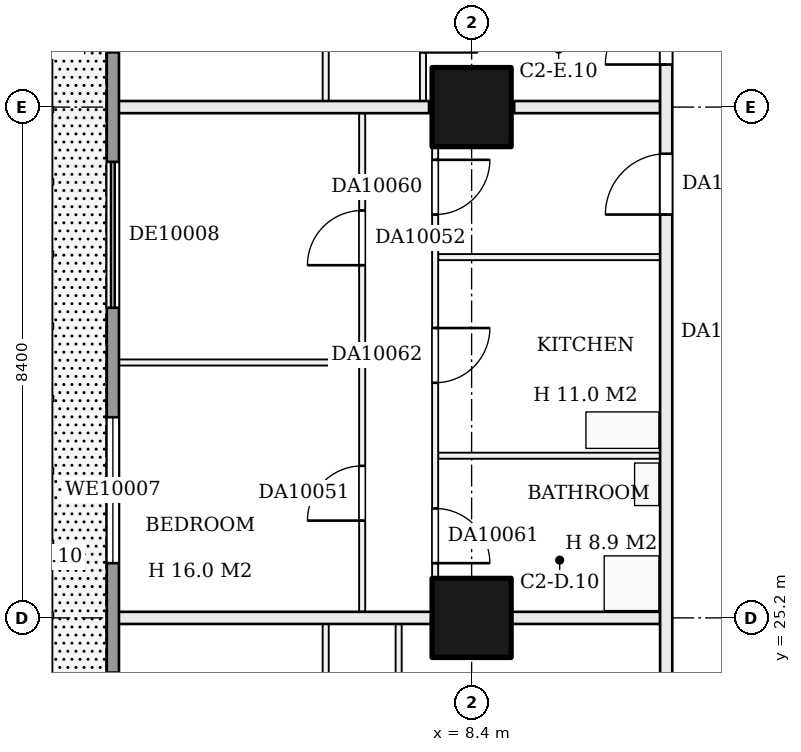
"""IFC4 building model, lengths in metres.
Left out: names, types, materials, properties, quantities, classifications, styles, units other than length and angle.
Written with IfcOpenShell. Run it as: python <this file> out.ifc"""

import sys

from ifc_helpers import new_model, si_unit, direction, frame, frame_2d, origin, origin_2d, place, context, subcontext, project, spatial, rectangle, extrude, element, fill, save


model = new_model("IFC4")
c1 = context("Model", 3, precision=1e-05, world=origin(), true_north=direction((0.0, 1.0)))
c2 = subcontext(c1, "Body", "Model", "MODEL_VIEW")
j1 = project(units=[si_unit("LENGTHUNIT", "METRE"), si_unit("PLANEANGLEUNIT", "RADIAN")], contexts=[c1])
p1 = place(None, origin())
s1 = spatial("IfcSite", under=j1, at=p1, CompositionType="ELEMENT")
p2 = place(p1, origin())
s2 = spatial("IfcBuilding", under=s1, at=p2, CompositionType="ELEMENT")
p3 = place(p2, frame((0.0, 0.0, 46.2)))
s3 = spatial("IfcBuildingStorey", under=s2, at=p3, CompositionType="ELEMENT", Elevation=46.2)
for number, where, z_axis, x_axis in (
    (1, (8.4, 25.2, 0.0), (0.0, 0.0, 1.0), (1.0, 0.0, 0.0)),
    (2, (8.4, 33.6, 0.0), (0.0, 0.0, 1.0), (1.0, 0.0, 0.0)),
):
    element("IfcColumn", number, at=place(p3, frame(where, z_axis=z_axis, x_axis=x_axis)), inside=s3, PredefinedType="COLUMN", context=c2, shape_type="SweptSolid", body=[
        extrude(rectangle(XDim=1.3, YDim=1.3, at=origin_2d()), origin(), (0.0, 0.0, 1.0), 3.22),
    ])
p4 = place(p3, frame((2.5, 25.2, 0.0), z_axis=(0.0, 0.0, 1.0), x_axis=(1.0, 0.0, 0.0)))
e3 = element("IfcWall", 3, at=p4, inside=s3, PredefinedType="PARTITIONING", context=c2, shape_type="SweptSolid", body=[
    extrude(rectangle(XDim=9.0, YDim=0.2, at=frame_2d((4.5, 0.0))), origin(), (0.0, 0.0, 1.0), 3.22),
])
p5 = place(p3, frame((7.85, 27.867, 0.0), z_axis=(0.0, 0.0, 1.0), x_axis=(1.0, 0.0, 0.0)))
e4 = element("IfcWall", 4, at=p5, inside=s3, PredefinedType="PARTITIONING", context=c2, shape_type="SweptSolid", body=[
    extrude(rectangle(XDim=3.65, YDim=0.1, at=frame_2d((1.825, 0.0))), origin(), (0.0, 0.0, 1.0), 3.22),
])
p6 = place(p3, frame((2.5, 29.4, 0.0), z_axis=(0.0, 0.0, 1.0), x_axis=(1.0, 0.0, 0.0)))
e5 = element("IfcWall", 5, at=p6, inside=s3, PredefinedType="PARTITIONING", context=c2, shape_type="SweptSolid", body=[
    extrude(rectangle(XDim=4.05, YDim=0.1, at=frame_2d((2.025, 0.0))), origin(), (0.0, 0.0, 1.0), 3.22),
])
p7 = place(p3, frame((7.85, 31.133, 0.0), z_axis=(0.0, 0.0, 1.0), x_axis=(1.0, 0.0, 0.0)))
e6 = element("IfcWall", 6, at=p7, inside=s3, PredefinedType="PARTITIONING", context=c2, shape_type="SweptSolid", body=[
    extrude(rectangle(XDim=3.65, YDim=0.1, at=frame_2d((1.825, 0.0))), origin(), (0.0, 0.0, 1.0), 3.22),
])
p8 = place(p3, frame((2.5, 33.6, 0.0), z_axis=(0.0, 0.0, 1.0), x_axis=(1.0, 0.0, 0.0)))
e7 = element("IfcWall", 7, at=p8, inside=s3, PredefinedType="PARTITIONING", context=c2, shape_type="SweptSolid", body=[
    extrude(rectangle(XDim=5.2, YDim=0.2, at=frame_2d((2.6, 0.0))), origin(), (0.0, 0.0, 1.0), 3.22),
])
p9 = place(p3, frame((9.1, 33.6, 0.0), z_axis=(0.0, 0.0, 1.0), x_axis=(1.0, 0.0, 0.0)))
e8 = element("IfcWall", 8, at=p9, inside=s3, PredefinedType="PARTITIONING", context=c2, shape_type="SweptSolid", body=[
    extrude(rectangle(XDim=2.4, YDim=0.2, at=frame_2d((1.2, 0.0))), origin(), (0.0, 0.0, 1.0), 3.22),
])
p10 = place(p3, frame((6.0, 12.7, 0.0), z_axis=(0.0, 0.0, 1.0), x_axis=(0.0, 1.0, 0.0)))
e9 = element("IfcWall", 9, at=p10, inside=s3, PredefinedType="PARTITIONING", context=c2, shape_type="SweptSolid", body=[
    extrude(rectangle(XDim=12.4, YDim=0.1, at=frame_2d((6.2, 0.0))), origin(), (0.0, 0.0, 1.0), 3.22),
])
p11 = place(p10, frame((3.7, 0.0, 0.0)))
e10 = element("IfcOpeningElement", 10, at=p11, cuts=e9, PredefinedType="OPENING", context=c2, shape_type="SweptSolid", body=[
    extrude(rectangle(XDim=0.9, YDim=2.1, at=frame_2d((0.45, 1.05))), frame((0.0, 0.06, 0.0), z_axis=(0.0, -1.0, 0.0), x_axis=(1.0, 0.0, 0.0)), (0.0, 0.0, 1.0), 0.12),
])
p12 = place(p10, frame((10.0, 0.0, 0.0)))
e11 = element("IfcOpeningElement", 11, at=p12, cuts=e9, PredefinedType="OPENING", context=c2, shape_type="SweptSolid", body=[
    extrude(rectangle(XDim=0.9, YDim=2.1, at=frame_2d((0.45, 1.05))), frame((0.0, 0.06, 0.0), z_axis=(0.0, -1.0, 0.0), x_axis=(1.0, 0.0, 0.0)), (0.0, 0.0, 1.0), 0.12),
])
p13 = place(p3, frame((6.0, 33.7, 0.0), z_axis=(0.0, 0.0, 1.0), x_axis=(0.0, 1.0, 0.0)))
e12 = element("IfcWall", 12, at=p13, inside=s3, PredefinedType="PARTITIONING", context=c2, shape_type="SweptSolid", body=[
    extrude(rectangle(XDim=8.2, YDim=0.1, at=frame_2d((4.1, 0.0))), origin(), (0.0, 0.0, 1.0), 3.22),
])
p14 = place(p13, frame((1.5, 0.0, 0.0)))
e13 = element("IfcOpeningElement", 13, at=p14, cuts=e12, PredefinedType="OPENING", context=c2, shape_type="SweptSolid", body=[
    extrude(rectangle(XDim=0.9, YDim=2.1, at=frame_2d((0.45, 1.05))), frame((0.0, 0.06, 0.0), z_axis=(0.0, -1.0, 0.0), x_axis=(1.0, 0.0, 0.0)), (0.0, 0.0, 1.0), 0.12),
])
p15 = place(p13, frame((5.7, 0.0, 0.0)))
e14 = element("IfcOpeningElement", 14, at=p15, cuts=e12, PredefinedType="OPENING", context=c2, shape_type="SweptSolid", body=[
    extrude(rectangle(XDim=0.9, YDim=2.1, at=frame_2d((0.45, 1.05))), frame((0.0, 0.06, 0.0), z_axis=(0.0, -1.0, 0.0), x_axis=(1.0, 0.0, 0.0)), (0.0, 0.0, 1.0), 0.12),
])
p16 = place(p3, frame((6.6, 25.3, 0.0), z_axis=(0.0, 0.0, 1.0), x_axis=(0.0, 1.0, 0.0)))
e15 = element("IfcWall", 15, at=p16, inside=s3, PredefinedType="PARTITIONING", context=c2, shape_type="SweptSolid", body=[
    extrude(rectangle(XDim=8.2, YDim=0.1, at=frame_2d((4.1, 0.0))), origin(), (0.0, 0.0, 1.0), 3.22),
])
p17 = place(p16, frame((1.5, 0.0, 0.0)))
e16 = element("IfcOpeningElement", 16, at=p17, cuts=e15, PredefinedType="OPENING", context=c2, shape_type="SweptSolid", body=[
    extrude(rectangle(XDim=0.9, YDim=2.1, at=frame_2d((0.45, 1.05))), frame((0.0, 0.06, 0.0), z_axis=(0.0, -1.0, 0.0), x_axis=(1.0, 0.0, 0.0)), (0.0, 0.0, 1.0), 0.12),
])
p18 = place(p16, frame((5.7, 0.0, 0.0)))
e17 = element("IfcOpeningElement", 17, at=p18, cuts=e15, PredefinedType="OPENING", context=c2, shape_type="SweptSolid", body=[
    extrude(rectangle(XDim=0.9, YDim=2.1, at=frame_2d((0.45, 1.05))), frame((0.0, 0.06, 0.0), z_axis=(0.0, -1.0, 0.0), x_axis=(1.0, 0.0, 0.0)), (0.0, 0.0, 1.0), 0.12),
])
p19 = place(p3, frame((7.2, 12.7, 0.0), z_axis=(0.0, 0.0, 1.0), x_axis=(0.0, 1.0, 0.0)))
e18 = element("IfcWall", 18, at=p19, inside=s3, PredefinedType="PARTITIONING", context=c2, shape_type="SweptSolid", body=[
    extrude(rectangle(XDim=12.4, YDim=0.1, at=frame_2d((6.2, 0.0))), origin(), (0.0, 0.0, 1.0), 3.22),
])
p20 = place(p19, frame((6.4, 0.0, 0.0)))
e19 = element("IfcOpeningElement", 19, at=p20, cuts=e18, PredefinedType="OPENING", context=c2, shape_type="SweptSolid", body=[
    extrude(rectangle(XDim=0.9, YDim=2.1, at=frame_2d((0.45, 1.05))), frame((0.0, 0.06, 0.0), z_axis=(0.0, -1.0, 0.0), x_axis=(1.0, 0.0, 0.0)), (0.0, 0.0, 1.0), 0.12),
])
p21 = place(p19, frame((0.4, 0.0, 0.0)))
e20 = element("IfcOpeningElement", 20, at=p21, cuts=e18, PredefinedType="OPENING", context=c2, shape_type="SweptSolid", body=[
    extrude(rectangle(XDim=0.9, YDim=2.1, at=frame_2d((0.45, 1.05))), frame((0.0, 0.06, 0.0), z_axis=(0.0, -1.0, 0.0), x_axis=(1.0, 0.0, 0.0)), (0.0, 0.0, 1.0), 0.12),
])
p22 = place(p19, frame((2.65, 0.0, 0.0)))
e21 = element("IfcOpeningElement", 21, at=p22, cuts=e18, PredefinedType="OPENING", context=c2, shape_type="SweptSolid", body=[
    extrude(rectangle(XDim=0.9, YDim=2.1, at=frame_2d((0.45, 1.05))), frame((0.0, 0.06, 0.0), z_axis=(0.0, -1.0, 0.0), x_axis=(1.0, 0.0, 0.0)), (0.0, 0.0, 1.0), 0.12),
])
p23 = place(p19, frame((10.05, 0.0, 0.0)))
e22 = element("IfcOpeningElement", 22, at=p23, cuts=e18, PredefinedType="OPENING", context=c2, shape_type="SweptSolid", body=[
    extrude(rectangle(XDim=0.9, YDim=2.1, at=frame_2d((0.45, 1.05))), frame((0.0, 0.06, 0.0), z_axis=(0.0, -1.0, 0.0), x_axis=(1.0, 0.0, 0.0)), (0.0, 0.0, 1.0), 0.12),
])
p24 = place(p3, frame((7.6, 33.7, 0.0), z_axis=(0.0, 0.0, 1.0), x_axis=(0.0, 1.0, 0.0)))
e23 = element("IfcWall", 23, at=p24, inside=s3, PredefinedType="PARTITIONING", context=c2, shape_type="SweptSolid", body=[
    extrude(rectangle(XDim=8.2, YDim=0.1, at=frame_2d((4.1, 0.0))), origin(), (0.0, 0.0, 1.0), 3.22),
])
p25 = place(p24, frame((0.8, 0.0, 0.0)))
e24 = element("IfcOpeningElement", 24, at=p25, cuts=e23, PredefinedType="OPENING", context=c2, shape_type="SweptSolid", body=[
    extrude(rectangle(XDim=0.9, YDim=2.1, at=frame_2d((0.45, 1.05))), frame((0.0, 0.06, 0.0), z_axis=(0.0, -1.0, 0.0), x_axis=(1.0, 0.0, 0.0)), (0.0, 0.0, 1.0), 0.12),
])
p26 = place(p24, frame((3.567, 0.0, 0.0)))
e25 = element("IfcOpeningElement", 25, at=p26, cuts=e23, PredefinedType="OPENING", context=c2, shape_type="SweptSolid", body=[
    extrude(rectangle(XDim=0.9, YDim=2.1, at=frame_2d((0.45, 1.05))), frame((0.0, 0.06, 0.0), z_axis=(0.0, -1.0, 0.0), x_axis=(1.0, 0.0, 0.0)), (0.0, 0.0, 1.0), 0.12),
])
p27 = place(p24, frame((6.533, 0.0, 0.0)))
e26 = element("IfcOpeningElement", 26, at=p27, cuts=e23, PredefinedType="OPENING", context=c2, shape_type="SweptSolid", body=[
    extrude(rectangle(XDim=0.9, YDim=2.1, at=frame_2d((0.45, 1.05))), frame((0.0, 0.06, 0.0), z_axis=(0.0, -1.0, 0.0), x_axis=(1.0, 0.0, 0.0)), (0.0, 0.0, 1.0), 0.12),
])
p28 = place(p3, frame((7.8, 25.3, 0.0), z_axis=(0.0, 0.0, 1.0), x_axis=(0.0, 1.0, 0.0)))
e27 = element("IfcWall", 27, at=p28, inside=s3, PredefinedType="PARTITIONING", context=c2, shape_type="SweptSolid", body=[
    extrude(rectangle(XDim=8.2, YDim=0.1, at=frame_2d((4.1, 0.0))), origin(), (0.0, 0.0, 1.0), 3.22),
])
p29 = place(p28, frame((6.533, 0.0, 0.0)))
e28 = element("IfcOpeningElement", 28, at=p29, cuts=e27, PredefinedType="OPENING", context=c2, shape_type="SweptSolid", body=[
    extrude(rectangle(XDim=0.9, YDim=2.1, at=frame_2d((0.45, 1.05))), frame((0.0, 0.06, 0.0), z_axis=(0.0, -1.0, 0.0), x_axis=(1.0, 0.0, 0.0)), (0.0, 0.0, 1.0), 0.12),
])
p30 = place(p28, frame((0.8, 0.0, 0.0)))
e29 = element("IfcOpeningElement", 29, at=p30, cuts=e27, PredefinedType="OPENING", context=c2, shape_type="SweptSolid", body=[
    extrude(rectangle(XDim=0.9, YDim=2.1, at=frame_2d((0.45, 1.05))), frame((0.0, 0.06, 0.0), z_axis=(0.0, -1.0, 0.0), x_axis=(1.0, 0.0, 0.0)), (0.0, 0.0, 1.0), 0.12),
])
p31 = place(p28, frame((3.767, 0.0, 0.0)))
e30 = element("IfcOpeningElement", 30, at=p31, cuts=e27, PredefinedType="OPENING", context=c2, shape_type="SweptSolid", body=[
    extrude(rectangle(XDim=0.9, YDim=2.1, at=frame_2d((0.45, 1.05))), frame((0.0, 0.06, 0.0), z_axis=(0.0, -1.0, 0.0), x_axis=(1.0, 0.0, 0.0)), (0.0, 0.0, 1.0), 0.12),
])
p32 = place(p3, frame((11.6, 11.7, 0.0), z_axis=(0.0, 0.0, 1.0), x_axis=(0.0, 1.0, 0.0)))
e31 = element("IfcWall", 31, at=p32, inside=s3, PredefinedType="PARTITIONING", context=c2, shape_type="SweptSolid", body=[
    extrude(rectangle(XDim=30.3, YDim=0.2, at=frame_2d((15.15, 0.0))), origin(), (0.0, 0.0, 1.0), 3.22),
])
p33 = place(p32, frame((7.3, 0.0, 0.0)))
e32 = element("IfcOpeningElement", 32, at=p33, cuts=e31, PredefinedType="OPENING", context=c2, shape_type="SweptSolid", body=[
    extrude(rectangle(XDim=1.0, YDim=2.1, at=frame_2d((0.5, 1.05))), frame((0.0, 0.11, 0.0), z_axis=(0.0, -1.0, 0.0), x_axis=(1.0, 0.0, 0.0)), (0.0, 0.0, 1.0), 0.22),
])
p34 = place(p32, frame((20.133, 0.0, 0.0)))
e33 = element("IfcOpeningElement", 33, at=p34, cuts=e31, PredefinedType="OPENING", context=c2, shape_type="SweptSolid", body=[
    extrude(rectangle(XDim=1.0, YDim=2.1, at=frame_2d((0.5, 1.05))), frame((0.0, 0.11, 0.0), z_axis=(0.0, -1.0, 0.0), x_axis=(1.0, 0.0, 0.0)), (0.0, 0.0, 1.0), 0.22),
])
p35 = place(p32, frame((22.6, 0.0, 0.0)))
e34 = element("IfcOpeningElement", 34, at=p35, cuts=e31, PredefinedType="OPENING", context=c2, shape_type="SweptSolid", body=[
    extrude(rectangle(XDim=1.0, YDim=2.1, at=frame_2d((0.5, 1.05))), frame((0.0, 0.11, 0.0), z_axis=(0.0, -1.0, 0.0), x_axis=(1.0, 0.0, 0.0)), (0.0, 0.0, 1.0), 0.22),
])
p36 = place(p3, frame((2.5, 53.8, 0.0), z_axis=(0.0, 0.0, 1.0), x_axis=(0.0, -1.0, 0.0)))
e35 = element("IfcWall", 35, at=p36, inside=s3, PredefinedType="SOLIDWALL", context=c2, shape_type="SweptSolid", body=[
    extrude(rectangle(XDim=48.8, YDim=0.2, at=frame_2d((24.4, 0.0))), origin(), (0.0, 0.0, 1.0), 3.22),
])
p37 = place(p36, frame((46.1, 0.0, 0.0)))
e36 = element("IfcOpeningElement", 36, at=p37, cuts=e35, PredefinedType="OPENING", context=c2, shape_type="SweptSolid", body=[
    extrude(rectangle(XDim=2.4, YDim=2.2, at=frame_2d((1.2, 1.1))), frame((0.0, 0.11, 0.0), z_axis=(0.0, -1.0, 0.0), x_axis=(1.0, 0.0, 0.0)), (0.0, 0.0, 1.0), 0.22),
])
p38 = place(p36, frame((42.1, 0.0, 0.0)))
e37 = element("IfcOpeningElement", 37, at=p38, cuts=e35, PredefinedType="OPENING", context=c2, shape_type="SweptSolid", body=[
    extrude(rectangle(XDim=2.4, YDim=2.2, at=frame_2d((1.2, 1.1))), frame((0.0, 0.11, 0.0), z_axis=(0.0, -1.0, 0.0), x_axis=(1.0, 0.0, 0.0)), (0.0, 0.0, 1.0), 0.22),
])
p39 = place(p36, frame((37.9, 0.0, 0.0)))
e38 = element("IfcOpeningElement", 38, at=p39, cuts=e35, PredefinedType="OPENING", context=c2, shape_type="SweptSolid", body=[
    extrude(rectangle(XDim=2.4, YDim=2.2, at=frame_2d((1.2, 1.1))), frame((0.0, 0.11, 0.0), z_axis=(0.0, -1.0, 0.0), x_axis=(1.0, 0.0, 0.0)), (0.0, 0.0, 1.0), 0.22),
])
p40 = place(p36, frame((33.7, 0.0, 0.0)))
e39 = element("IfcOpeningElement", 39, at=p40, cuts=e35, PredefinedType="OPENING", context=c2, shape_type="SweptSolid", body=[
    extrude(rectangle(XDim=2.4, YDim=2.2, at=frame_2d((1.2, 1.1))), frame((0.0, 0.11, 0.0), z_axis=(0.0, -1.0, 0.0), x_axis=(1.0, 0.0, 0.0)), (0.0, 0.0, 1.0), 0.22),
])
p41 = place(p36, frame((29.5, 0.0, 0.9)))
e40 = element("IfcOpeningElement", 40, at=p41, cuts=e35, PredefinedType="OPENING", context=c2, shape_type="SweptSolid", body=[
    extrude(rectangle(XDim=2.4, YDim=1.5, at=frame_2d((1.2, 0.75))), frame((0.0, 0.11, 0.0), z_axis=(0.0, -1.0, 0.0), x_axis=(1.0, 0.0, 0.0)), (0.0, 0.0, 1.0), 0.22),
])
p42 = place(p36, frame((25.3, 0.0, 0.9)))
e41 = element("IfcOpeningElement", 41, at=p42, cuts=e35, PredefinedType="OPENING", context=c2, shape_type="SweptSolid", body=[
    extrude(rectangle(XDim=2.4, YDim=1.5, at=frame_2d((1.2, 0.75))), frame((0.0, 0.11, 0.0), z_axis=(0.0, -1.0, 0.0), x_axis=(1.0, 0.0, 0.0)), (0.0, 0.0, 1.0), 0.22),
])
p43 = place(p36, frame((21.1, 0.0, 0.0)))
e42 = element("IfcOpeningElement", 42, at=p43, cuts=e35, PredefinedType="OPENING", context=c2, shape_type="SweptSolid", body=[
    extrude(rectangle(XDim=2.4, YDim=2.2, at=frame_2d((1.2, 1.1))), frame((0.0, 0.11, 0.0), z_axis=(0.0, -1.0, 0.0), x_axis=(1.0, 0.0, 0.0)), (0.0, 0.0, 1.0), 0.22),
])
p44 = place(p36, frame((16.9, 0.0, 0.0)))
e43 = element("IfcOpeningElement", 43, at=p44, cuts=e35, PredefinedType="OPENING", context=c2, shape_type="SweptSolid", body=[
    extrude(rectangle(XDim=2.4, YDim=2.2, at=frame_2d((1.2, 1.1))), frame((0.0, 0.11, 0.0), z_axis=(0.0, -1.0, 0.0), x_axis=(1.0, 0.0, 0.0)), (0.0, 0.0, 1.0), 0.22),
])
p45 = place(p36, frame((12.7, 0.0, 0.9)))
e44 = element("IfcOpeningElement", 44, at=p45, cuts=e35, PredefinedType="OPENING", context=c2, shape_type="SweptSolid", body=[
    extrude(rectangle(XDim=2.4, YDim=1.5, at=frame_2d((1.2, 0.75))), frame((0.0, 0.11, 0.0), z_axis=(0.0, -1.0, 0.0), x_axis=(1.0, 0.0, 0.0)), (0.0, 0.0, 1.0), 0.22),
])
p46 = place(p36, frame((8.5, 0.0, 0.9)))
e45 = element("IfcOpeningElement", 45, at=p46, cuts=e35, PredefinedType="OPENING", context=c2, shape_type="SweptSolid", body=[
    extrude(rectangle(XDim=2.4, YDim=1.5, at=frame_2d((1.2, 0.75))), frame((0.0, 0.11, 0.0), z_axis=(0.0, -1.0, 0.0), x_axis=(1.0, 0.0, 0.0)), (0.0, 0.0, 1.0), 0.22),
])
p47 = place(p36, frame((4.3, 0.0, 0.9)))
e46 = element("IfcOpeningElement", 46, at=p47, cuts=e35, PredefinedType="OPENING", context=c2, shape_type="SweptSolid", body=[
    extrude(rectangle(XDim=2.4, YDim=1.5, at=frame_2d((1.2, 0.75))), frame((0.0, 0.11, 0.0), z_axis=(0.0, -1.0, 0.0), x_axis=(1.0, 0.0, 0.0)), (0.0, 0.0, 1.0), 0.22),
])
p48 = place(p36, frame((0.3, 0.0, 0.0)))
e47 = element("IfcOpeningElement", 47, at=p48, cuts=e35, PredefinedType="OPENING", context=c2, shape_type="SweptSolid", body=[
    extrude(rectangle(XDim=2.4, YDim=2.2, at=frame_2d((1.2, 1.1))), frame((0.0, 0.11, 0.0), z_axis=(0.0, -1.0, 0.0), x_axis=(1.0, 0.0, 0.0)), (0.0, 0.0, 1.0), 0.22),
])
p49 = place(p17, origin())
e48 = element("IfcDoor", 48, at=p49, inside=s3, OperationType="SINGLE_SWING_LEFT", PredefinedType="DOOR", context=c2, shape_type="SweptSolid", body=[
    extrude(rectangle(XDim=0.9, YDim=2.1, at=frame_2d((0.45, 1.05))), frame((0.0, 0.025, 0.0), z_axis=(0.0, -1.0, 0.0), x_axis=(1.0, 0.0, 0.0)), (0.0, 0.0, 1.0), 0.05),
])
fill(e16, e48)
p50 = place(p18, origin())
e49 = element("IfcDoor", 49, at=p50, inside=s3, OperationType="SINGLE_SWING_LEFT", PredefinedType="DOOR", context=c2, shape_type="SweptSolid", body=[
    extrude(rectangle(XDim=0.9, YDim=2.1, at=frame_2d((0.45, 1.05))), frame((0.0, 0.025, 0.0), z_axis=(0.0, -1.0, 0.0), x_axis=(1.0, 0.0, 0.0)), (0.0, 0.0, 1.0), 0.05),
])
fill(e17, e49)
p51 = place(p29, frame((0.9, 0.0, 0.0), z_axis=(0.0, 0.0, 1.0), x_axis=(-1.0, 0.0, 0.0)))
e50 = element("IfcDoor", 50, at=p51, inside=s3, OperationType="SINGLE_SWING_LEFT", PredefinedType="DOOR", context=c2, shape_type="SweptSolid", body=[
    extrude(rectangle(XDim=0.9, YDim=2.1, at=frame_2d((0.45, 1.05))), frame((0.0, 0.025, 0.0), z_axis=(0.0, -1.0, 0.0), x_axis=(1.0, 0.0, 0.0)), (0.0, 0.0, 1.0), 0.05),
])
fill(e28, e50)
p52 = place(p30, frame((0.9, 0.0, 0.0), z_axis=(0.0, 0.0, 1.0), x_axis=(-1.0, 0.0, 0.0)))
e51 = element("IfcDoor", 51, at=p52, inside=s3, OperationType="SINGLE_SWING_RIGHT", PredefinedType="DOOR", context=c2, shape_type="SweptSolid", body=[
    extrude(rectangle(XDim=0.9, YDim=2.1, at=frame_2d((0.45, 1.05))), frame((0.0, 0.025, 0.0), z_axis=(0.0, -1.0, 0.0), x_axis=(1.0, 0.0, 0.0)), (0.0, 0.0, 1.0), 0.05),
])
fill(e29, e51)
p53 = place(p31, frame((0.9, 0.0, 0.0), z_axis=(0.0, 0.0, 1.0), x_axis=(-1.0, 0.0, 0.0)))
e52 = element("IfcDoor", 52, at=p53, inside=s3, OperationType="SINGLE_SWING_LEFT", PredefinedType="DOOR", context=c2, shape_type="SweptSolid", body=[
    extrude(rectangle(XDim=0.9, YDim=2.1, at=frame_2d((0.45, 1.05))), frame((0.0, 0.025, 0.0), z_axis=(0.0, -1.0, 0.0), x_axis=(1.0, 0.0, 0.0)), (0.0, 0.0, 1.0), 0.05),
])
fill(e30, e52)
p54 = place(p34, origin())
e53 = element("IfcDoor", 53, at=p54, inside=s3, OperationType="SINGLE_SWING_LEFT", PredefinedType="DOOR", context=c2, shape_type="SweptSolid", body=[
    extrude(rectangle(XDim=1.0, YDim=2.1, at=frame_2d((0.5, 1.05))), frame((0.0, 0.025, 0.0), z_axis=(0.0, -1.0, 0.0), x_axis=(1.0, 0.0, 0.0)), (0.0, 0.0, 1.0), 0.05),
])
fill(e33, e53)
p55 = place(p35, origin())
e54 = element("IfcDoor", 54, at=p55, inside=s3, OperationType="SINGLE_SWING_LEFT", PredefinedType="DOOR", context=c2, shape_type="SweptSolid", body=[
    extrude(rectangle(XDim=1.0, YDim=2.1, at=frame_2d((0.5, 1.05))), frame((0.0, 0.025, 0.0), z_axis=(0.0, -1.0, 0.0), x_axis=(1.0, 0.0, 0.0)), (0.0, 0.0, 1.0), 0.05),
])
fill(e34, e54)
p56 = place(p42, origin())
e55 = element("IfcWindow", 55, at=p56, inside=s3, PartitioningType="SINGLE_PANEL", PredefinedType="WINDOW", context=c2, shape_type="SweptSolid", body=[
    extrude(rectangle(XDim=2.4, YDim=1.5, at=frame_2d((1.2, 0.75))), frame((0.0, 0.03, 0.0), z_axis=(0.0, -1.0, 0.0), x_axis=(1.0, 0.0, 0.0)), (0.0, 0.0, 1.0), 0.06),
])
fill(e41, e55)
p57 = place(p43, origin())
e56 = element("IfcDoor", 56, at=p57, inside=s3, OperationType="DOUBLE_DOOR_SLIDING", PredefinedType="DOOR", context=c2, shape_type="SweptSolid", body=[
    extrude(rectangle(XDim=2.4, YDim=2.2, at=frame_2d((1.2, 1.1))), frame((0.0, 0.025, 0.0), z_axis=(0.0, -1.0, 0.0), x_axis=(1.0, 0.0, 0.0)), (0.0, 0.0, 1.0), 0.05),
])
fill(e42, e56)
save(model, sys.argv[1])
